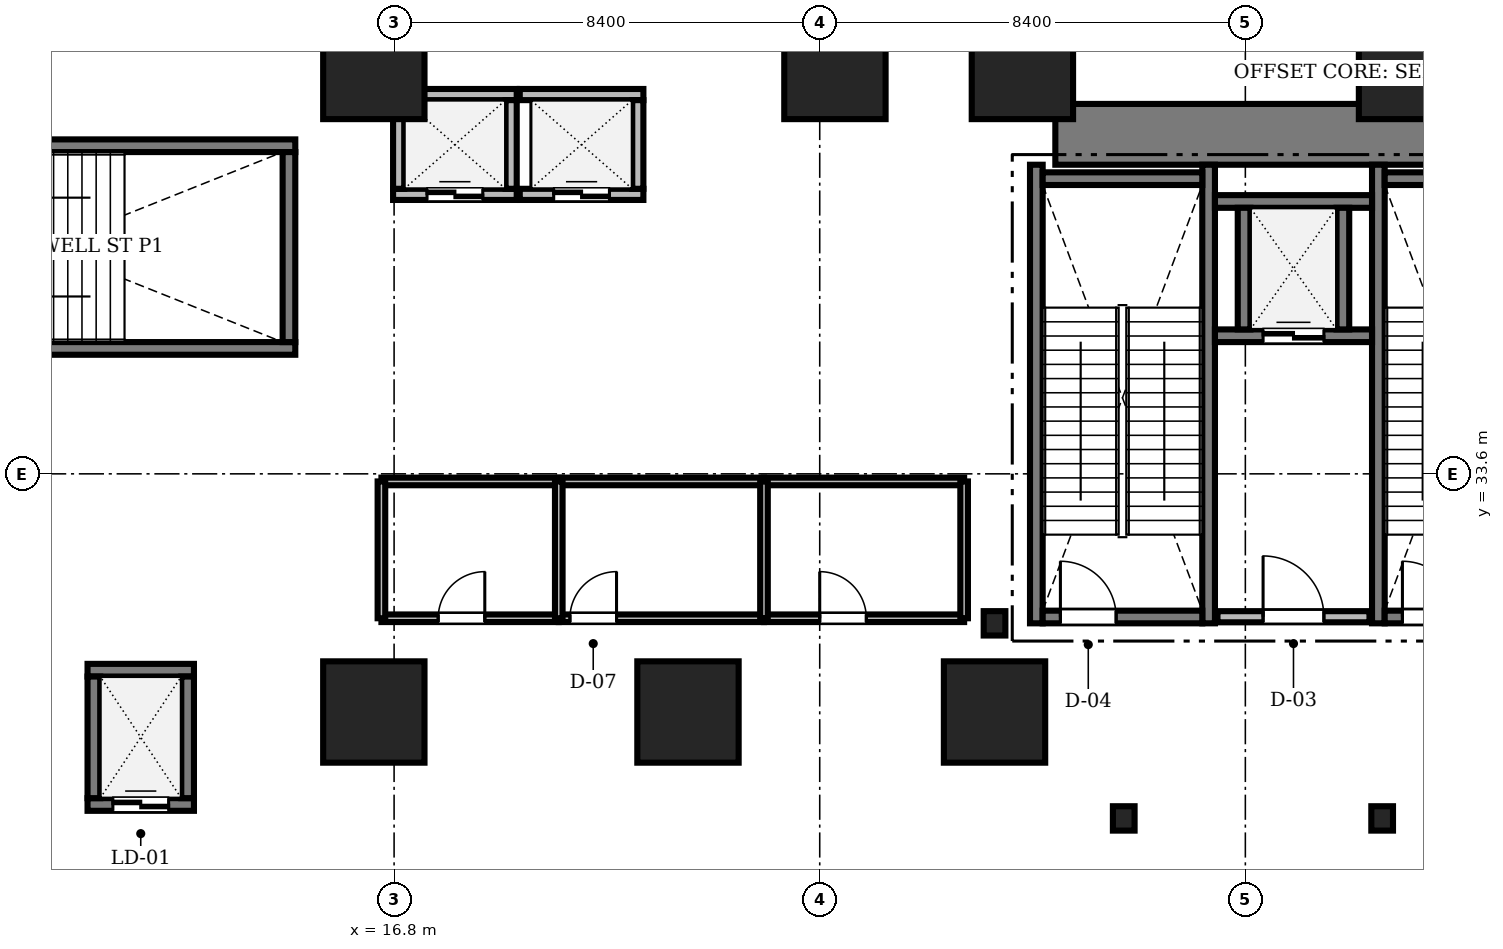
"""IFC4 building model, lengths in metres.
Left out: names, types, materials, properties, quantities, classifications, styles, units other than length and angle.
Written with IfcOpenShell. Run it as: python <this file> out.ifc"""

import sys

from ifc_helpers import new_model, si_unit, direction, frame, frame_2d, origin, origin_2d, place, context, subcontext, project, spatial, rectangle, i_section, extrude, source, transform, mapped, element, fill, save


model = new_model("IFC4")
c1 = context("Model", 3, precision=1e-05, world=origin(), true_north=direction((0.0, 1.0)))
c2 = subcontext(c1, "Body", "Model", "MODEL_VIEW")
j1 = project(units=[si_unit("LENGTHUNIT", "METRE"), si_unit("PLANEANGLEUNIT", "RADIAN")], contexts=[c1])
p1 = place(None, origin())
s1 = spatial("IfcSite", under=j1, at=p1, CompositionType="ELEMENT")
p2 = place(p1, origin())
s2 = spatial("IfcBuilding", under=s1, at=p2, CompositionType="ELEMENT")
p3 = place(p2, frame((0.0, 0.0, -6.0)))
s3 = spatial("IfcBuildingStorey", under=s2, at=p3, CompositionType="ELEMENT", Elevation=-6.0)
m1 = source(origin(), c2, "Body", "SweptSolid", [
    extrude(rectangle(XDim=17.52, YDim=1.2, at=frame_2d((8.76, 0.0))), origin(), (0.0, 0.0, 1.0), 5.6),
])
p4 = place(p3, frame((29.85, 40.3, 0.0), z_axis=(0.0, 0.0, 1.0), x_axis=(1.0, 0.0, 0.0)))
e1 = element("IfcWall", 1, at=p4, inside=s3, PredefinedType="SHEAR", context=c2, shape_type="MappedRepresentation", body=[
    mapped(m1, transform((0.0, 0.0, 0.0), scale=1.0)),
])
m2 = source(origin(), c2, "Body", "SweptSolid", [
    extrude(i_section(OverallWidth=0.428, OverallDepth=0.481, WebThickness=0.04, FlangeThickness=0.063, FilletRadius=0.015, at=origin_2d()), origin(), (0.0, 0.0, 1.0), 5.6),
])
for number, where, z_axis, x_axis in (
    (2, (36.3, 26.8, 0.0), (0.0, 0.0, 1.0), (1.0, 0.0, 0.0)),
    (3, (31.2, 26.8, 0.0), (0.0, 0.0, 1.0), (1.0, 0.0, 0.0)),
    (4, (28.65, 30.65, 0.0), (0.0, 0.0, 1.0), (1.0, 0.0, 0.0)),
):
    element("IfcColumn", number, at=place(p3, frame(where, z_axis=z_axis, x_axis=x_axis)), inside=s3, PredefinedType="COLUMN", context=c2, shape_type="MappedRepresentation", body=[
        mapped(m2, transform((0.0, 0.0, 0.0), scale=1.0)),
    ])
m3 = source(origin(), c2, "Body", "SweptSolid", [
    extrude(rectangle(XDim=2.0, YDim=2.0, at=origin_2d()), origin(), (0.0, 0.0, 1.0), 5.6),
])
for number, where, z_axis, x_axis in (
    (5, (16.4, 28.9, 0.0), (0.0, 0.0, 1.0), (1.0, 0.0, 0.0)),
    (6, (22.6, 28.9, 0.0), (0.0, 0.0, 1.0), (1.0, 0.0, 0.0)),
    (7, (28.65, 28.9, 0.0), (0.0, 0.0, 1.0), (1.0, 0.0, 0.0)),
    (8, (16.4, 41.6, 0.0), (0.0, 0.0, 1.0), (1.0, 0.0, 0.0)),
    (9, (25.5, 41.6, 0.0), (0.0, 0.0, 1.0), (1.0, 0.0, 0.0)),
    (10, (29.2, 41.6, 0.0), (0.0, 0.0, 1.0), (1.0, 0.0, 0.0)),
    (11, (36.84, 41.6, 0.0), (0.0, 0.0, 1.0), (1.0, 0.0, 0.0)),
):
    element("IfcColumn", number, at=place(p3, frame(where, z_axis=z_axis, x_axis=x_axis)), inside=s3, PredefinedType="COLUMN", context=c2, shape_type="MappedRepresentation", body=[
        mapped(m3, transform((0.0, 0.0, 0.0), scale=1.0)),
    ])
m4 = source(origin(), c2, "Body", "SweptSolid", [
    extrude(rectangle(XDim=9.05, YDim=0.25, at=frame_2d((4.525, 0.0))), origin(), (0.0, 0.0, 1.0), 5.8),
])
for number, where, z_axis, x_axis in (
    (12, (29.475, 30.65, 0.0), (0.0, 0.0, 1.0), (0.0, 1.0, 0.0)),
    (13, (32.875, 30.65, 0.0), (0.0, 0.0, 1.0), (0.0, 1.0, 0.0)),
):
    element("IfcWall", number, at=place(p3, frame(where, z_axis=z_axis, x_axis=x_axis)), inside=s3, PredefinedType="SOLIDWALL", context=c2, shape_type="MappedRepresentation", body=[
        mapped(m4, transform((0.0, 0.0, 0.0), scale=1.0)),
    ])
m5 = source(origin(), c2, "Body", "SweptSolid", [
    extrude(rectangle(XDim=3.15, YDim=0.25, at=frame_2d((1.575, 0.0))), origin(), (0.0, 0.0, 1.0), 5.8),
])
p5 = place(p3, frame((29.6, 39.425, 0.0), z_axis=(0.0, 0.0, 1.0), x_axis=(1.0, 0.0, 0.0)))
e14 = element("IfcWall", 14, at=p5, inside=s3, PredefinedType="SOLIDWALL", context=c2, shape_type="MappedRepresentation", body=[
    mapped(m5, transform((0.0, 0.0, 0.0), scale=1.0)),
])
p6 = place(p3, frame((29.6, 30.775, 0.0), z_axis=(0.0, 0.0, 1.0), x_axis=(1.0, 0.0, 0.0)))
e15 = element("IfcWall", 15, at=p6, inside=s3, PredefinedType="SOLIDWALL", context=c2, shape_type="MappedRepresentation", body=[
    mapped(m5, transform((0.0, 0.0, 0.0), scale=1.0)),
])
m6 = source(origin(), c2, "Body", "SweptSolid", [
    extrude(rectangle(XDim=1.1, YDim=2.2, at=frame_2d((0.55, 1.1))), frame((0.0, 0.135, 0.0), z_axis=(0.0, -1.0, 0.0), x_axis=(1.0, 0.0, 0.0)), (0.0, 0.0, 1.0), 0.27),
])
p7 = place(p6, frame((0.35, 0.0, 0.0)))
e16 = element("IfcOpeningElement", 16, at=p7, cuts=e15, PredefinedType="OPENING", context=c2, shape_type="MappedRepresentation", body=[
    mapped(m6, transform((0.0, 0.0, 0.0), scale=1.0)),
])
p8 = place(p3, frame((36.225, 30.65, 0.0), z_axis=(0.0, 0.0, 1.0), x_axis=(0.0, 1.0, 0.0)))
e17 = element("IfcWall", 17, at=p8, inside=s3, PredefinedType="SOLIDWALL", context=c2, shape_type="MappedRepresentation", body=[
    mapped(m4, transform((0.0, 0.0, 0.0), scale=1.0)),
])
p9 = place(p3, frame((36.35, 39.425, 0.0), z_axis=(0.0, 0.0, 1.0), x_axis=(1.0, 0.0, 0.0)))
e18 = element("IfcWall", 18, at=p9, inside=s3, PredefinedType="SOLIDWALL", context=c2, shape_type="MappedRepresentation", body=[
    mapped(m5, transform((0.0, 0.0, 0.0), scale=1.0)),
])
p10 = place(p3, frame((36.35, 30.775, 0.0), z_axis=(0.0, 0.0, 1.0), x_axis=(1.0, 0.0, 0.0)))
e19 = element("IfcWall", 19, at=p10, inside=s3, PredefinedType="SOLIDWALL", context=c2, shape_type="MappedRepresentation", body=[
    mapped(m5, transform((0.0, 0.0, 0.0), scale=1.0)),
])
p11 = place(p10, frame((0.35, 0.0, 0.0)))
e20 = element("IfcOpeningElement", 20, at=p11, cuts=e19, PredefinedType="OPENING", context=c2, shape_type="MappedRepresentation", body=[
    mapped(m6, transform((0.0, 0.0, 0.0), scale=1.0)),
])
m7 = source(origin(), c2, "Body", "SweptSolid", [
    extrude(rectangle(XDim=9.9, YDim=0.25, at=frame_2d((4.95, 0.0))), origin(), (0.0, 0.0, 1.0), 5.8),
])
for number, where, z_axis, x_axis in (
    (21, (4.95, 36.075, 0.0), (0.0, 0.0, 1.0), (1.0, 0.0, 0.0)),
    (22, (4.95, 40.075, 0.0), (0.0, 0.0, 1.0), (1.0, 0.0, 0.0)),
):
    element("IfcWall", number, at=place(p3, frame(where, z_axis=z_axis, x_axis=x_axis)), inside=s3, PredefinedType="SOLIDWALL", context=c2, shape_type="MappedRepresentation", body=[
        mapped(m7, transform((0.0, 0.0, 0.0), scale=1.0)),
    ])
m8 = source(origin(), c2, "Body", "SweptSolid", [
    extrude(rectangle(XDim=3.75, YDim=0.25, at=frame_2d((1.875, 0.0))), origin(), (0.0, 0.0, 1.0), 5.8),
])
p12 = place(p3, frame((14.725, 36.2, 0.0), z_axis=(0.0, 0.0, 1.0), x_axis=(0.0, 1.0, 0.0)))
e23 = element("IfcWall", 23, at=p12, inside=s3, PredefinedType="SOLIDWALL", context=c2, shape_type="MappedRepresentation", body=[
    mapped(m8, transform((0.0, 0.0, 0.0), scale=1.0)),
])
m9 = source(origin(), c2, "Body", "SweptSolid", [
    extrude(rectangle(XDim=3.0, YDim=0.22, at=frame_2d((1.5, 0.0))), origin(), (0.0, 0.0, 1.0), 5.6),
])
p13 = place(p3, frame((33.05, 30.78, 0.0), z_axis=(0.0, 0.0, 1.0), x_axis=(1.0, 0.0, 0.0)))
e24 = element("IfcWall", 24, at=p13, inside=s3, PredefinedType="SOLIDWALL", context=c2, shape_type="MappedRepresentation", body=[
    mapped(m9, transform((0.0, 0.0, 0.0), scale=1.0)),
])
m10 = source(origin(), c2, "Body", "SweptSolid", [
    extrude(rectangle(XDim=1.2, YDim=2.2, at=frame_2d((0.6, 1.1))), frame((0.0, 0.12, 0.0), z_axis=(0.0, -1.0, 0.0), x_axis=(1.0, 0.0, 0.0)), (0.0, 0.0, 1.0), 0.24),
])
p14 = place(p13, frame((0.9, 0.0, 0.0)))
e25 = element("IfcOpeningElement", 25, at=p14, cuts=e24, PredefinedType="OPENING", context=c2, shape_type="MappedRepresentation", body=[
    mapped(m10, transform((0.0, 0.0, 0.0), scale=1.0)),
])
m11 = source(origin(), c2, "Body", "SweptSolid", [
    extrude(rectangle(XDim=2.1, YDim=0.25, at=frame_2d((1.05, 0.0))), origin(), (0.0, 0.0, 1.0), 5.6),
])
p15 = place(p3, frame((10.75, 27.075, 0.0), z_axis=(0.0, 0.0, 1.0), x_axis=(1.0, 0.0, 0.0)))
e26 = element("IfcWall", 26, at=p15, inside=s3, PredefinedType="SOLIDWALL", context=c2, shape_type="MappedRepresentation", body=[
    mapped(m11, transform((0.0, 0.0, 0.0), scale=1.0)),
])
p16 = place(p15, frame((0.5, 0.0, 0.0)))
e27 = element("IfcOpeningElement", 27, at=p16, cuts=e26, PredefinedType="OPENING", context=c2, shape_type="MappedRepresentation", body=[
    mapped(m6, transform((0.0, 0.0, 0.0), scale=1.0)),
])
p17 = place(p3, frame((10.75, 29.725, 0.0), z_axis=(0.0, 0.0, 1.0), x_axis=(1.0, 0.0, 0.0)))
e28 = element("IfcWall", 28, at=p17, inside=s3, PredefinedType="SOLIDWALL", context=c2, shape_type="MappedRepresentation", body=[
    mapped(m11, transform((0.0, 0.0, 0.0), scale=1.0)),
])
m12 = source(origin(), c2, "Body", "SweptSolid", [
    extrude(rectangle(XDim=2.4, YDim=0.25, at=frame_2d((1.2, 0.0))), origin(), (0.0, 0.0, 1.0), 5.6),
])
for number, where, z_axis, x_axis in (
    (29, (10.875, 27.2, 0.0), (0.0, 0.0, 1.0), (0.0, 1.0, 0.0)),
    (30, (12.725, 27.2, 0.0), (0.0, 0.0, 1.0), (0.0, 1.0, 0.0)),
):
    element("IfcWall", number, at=place(p3, frame(where, z_axis=z_axis, x_axis=x_axis)), inside=s3, PredefinedType="SOLIDWALL", context=c2, shape_type="MappedRepresentation", body=[
        mapped(m12, transform((0.0, 0.0, 0.0), scale=1.0)),
    ])
m13 = source(origin(), c2, "Body", "SweptSolid", [
    extrude(rectangle(XDim=2.44, YDim=0.22, at=frame_2d((1.22, 0.0))), origin(), (0.0, 0.0, 1.0), 5.6),
])
p18 = place(p3, frame((16.78, 39.115, 0.0), z_axis=(0.0, 0.0, 1.0), x_axis=(1.0, 0.0, 0.0)))
e31 = element("IfcWall", 31, at=p18, inside=s3, PredefinedType="SOLIDWALL", context=c2, shape_type="MappedRepresentation", body=[
    mapped(m13, transform((0.0, 0.0, 0.0), scale=1.0)),
])
m14 = source(origin(), c2, "Body", "SweptSolid", [
    extrude(rectangle(XDim=1.1, YDim=2.2, at=frame_2d((0.55, 1.1))), frame((0.0, 0.12, 0.0), z_axis=(0.0, -1.0, 0.0), x_axis=(1.0, 0.0, 0.0)), (0.0, 0.0, 1.0), 0.24),
])
p19 = place(p18, frame((0.67, 0.0, 0.0)))
e32 = element("IfcOpeningElement", 32, at=p19, cuts=e31, PredefinedType="OPENING", context=c2, shape_type="MappedRepresentation", body=[
    mapped(m14, transform((0.0, 0.0, 0.0), scale=1.0)),
])
p20 = place(p3, frame((16.78, 41.085, 0.0), z_axis=(0.0, 0.0, 1.0), x_axis=(1.0, 0.0, 0.0)))
e33 = element("IfcWall", 33, at=p20, inside=s3, PredefinedType="SOLIDWALL", context=c2, shape_type="MappedRepresentation", body=[
    mapped(m13, transform((0.0, 0.0, 0.0), scale=1.0)),
])
m15 = source(origin(), c2, "Body", "SweptSolid", [
    extrude(rectangle(XDim=1.75, YDim=0.22, at=frame_2d((0.875, 0.0))), origin(), (0.0, 0.0, 1.0), 5.6),
])
for number, where, z_axis, x_axis in (
    (34, (16.89, 39.225, 0.0), (0.0, 0.0, 1.0), (0.0, 1.0, 0.0)),
    (35, (19.11, 39.225, 0.0), (0.0, 0.0, 1.0), (0.0, 1.0, 0.0)),
):
    element("IfcWall", number, at=place(p3, frame(where, z_axis=z_axis, x_axis=x_axis)), inside=s3, PredefinedType="SOLIDWALL", context=c2, shape_type="MappedRepresentation", body=[
        mapped(m15, transform((0.0, 0.0, 0.0), scale=1.0)),
    ])
p21 = place(p3, frame((19.28, 39.115, 0.0), z_axis=(0.0, 0.0, 1.0), x_axis=(1.0, 0.0, 0.0)))
e36 = element("IfcWall", 36, at=p21, inside=s3, PredefinedType="SOLIDWALL", context=c2, shape_type="MappedRepresentation", body=[
    mapped(m13, transform((0.0, 0.0, 0.0), scale=1.0)),
])
p22 = place(p21, frame((0.67, 0.0, 0.0)))
e37 = element("IfcOpeningElement", 37, at=p22, cuts=e36, PredefinedType="OPENING", context=c2, shape_type="MappedRepresentation", body=[
    mapped(m14, transform((0.0, 0.0, 0.0), scale=1.0)),
])
p23 = place(p3, frame((19.28, 41.085, 0.0), z_axis=(0.0, 0.0, 1.0), x_axis=(1.0, 0.0, 0.0)))
e38 = element("IfcWall", 38, at=p23, inside=s3, PredefinedType="SOLIDWALL", context=c2, shape_type="MappedRepresentation", body=[
    mapped(m13, transform((0.0, 0.0, 0.0), scale=1.0)),
])
p24 = place(p3, frame((21.61, 39.225, 0.0), z_axis=(0.0, 0.0, 1.0), x_axis=(0.0, 1.0, 0.0)))
e39 = element("IfcWall", 39, at=p24, inside=s3, PredefinedType="SOLIDWALL", context=c2, shape_type="MappedRepresentation", body=[
    mapped(m15, transform((0.0, 0.0, 0.0), scale=1.0)),
])
m16 = source(origin(), c2, "Body", "SweptSolid", [
    extrude(rectangle(XDim=3.1, YDim=0.25, at=frame_2d((1.55, 0.0))), origin(), (0.0, 0.0, 1.0), 5.6),
])
p25 = place(p3, frame((33.0, 36.325, 0.0), z_axis=(0.0, 0.0, 1.0), x_axis=(1.0, 0.0, 0.0)))
e40 = element("IfcWall", 40, at=p25, inside=s3, PredefinedType="SOLIDWALL", context=c2, shape_type="MappedRepresentation", body=[
    mapped(m16, transform((0.0, 0.0, 0.0), scale=1.0)),
])
m17 = source(origin(), c2, "Body", "SweptSolid", [
    extrude(rectangle(XDim=1.2, YDim=2.25, at=frame_2d((0.6, 1.125))), frame((0.0, 0.135, 0.0), z_axis=(0.0, -1.0, 0.0), x_axis=(1.0, 0.0, 0.0)), (0.0, 0.0, 1.0), 0.27),
])
p26 = place(p25, frame((0.95, 0.0, 0.0)))
e41 = element("IfcOpeningElement", 41, at=p26, cuts=e40, PredefinedType="OPENING", context=c2, shape_type="MappedRepresentation", body=[
    mapped(m17, transform((0.0, 0.0, 0.0), scale=1.0)),
])
p27 = place(p3, frame((33.0, 38.975, 0.0), z_axis=(0.0, 0.0, 1.0), x_axis=(1.0, 0.0, 0.0)))
e42 = element("IfcWall", 42, at=p27, inside=s3, PredefinedType="SOLIDWALL", context=c2, shape_type="MappedRepresentation", body=[
    mapped(m16, transform((0.0, 0.0, 0.0), scale=1.0)),
])
for number, where, z_axis, x_axis in (
    (43, (33.575, 36.45, 0.0), (0.0, 0.0, 1.0), (0.0, 1.0, 0.0)),
    (44, (35.525, 36.45, 0.0), (0.0, 0.0, 1.0), (0.0, 1.0, 0.0)),
):
    element("IfcWall", number, at=place(p3, frame(where, z_axis=z_axis, x_axis=x_axis)), inside=s3, PredefinedType="SOLIDWALL", context=c2, shape_type="MappedRepresentation", body=[
        mapped(m12, transform((0.0, 0.0, 0.0), scale=1.0)),
    ])
m18 = source(origin(), c2, "Body", "SweptSolid", [
    extrude(rectangle(XDim=4.05, YDim=0.15, at=frame_2d((2.025, 0.0))), origin(), (0.0, 0.0, 1.0), 5.6),
])
p28 = place(p3, frame((20.05, 30.75, 0.0), z_axis=(0.0, 0.0, 1.0), x_axis=(1.0, 0.0, 0.0)))
e45 = element("IfcWall", 45, at=p28, inside=s3, PredefinedType="PARTITIONING", context=c2, shape_type="MappedRepresentation", body=[
    mapped(m18, transform((0.0, 0.0, 0.0), scale=1.0)),
])
m19 = source(origin(), c2, "Body", "SweptSolid", [
    extrude(rectangle(XDim=0.92, YDim=2.1, at=frame_2d((0.46, 1.05))), frame((0.0, 0.085, 0.0), z_axis=(0.0, -1.0, 0.0), x_axis=(1.0, 0.0, 0.0)), (0.0, 0.0, 1.0), 0.17),
])
p29 = place(p28, frame((0.22, 0.0, 0.0)))
e46 = element("IfcOpeningElement", 46, at=p29, cuts=e45, PredefinedType="OPENING", context=c2, shape_type="MappedRepresentation", body=[
    mapped(m19, transform((0.0, 0.0, 0.0), scale=1.0)),
])
m20 = source(origin(), c2, "Body", "SweptSolid", [
    extrude(rectangle(XDim=3.95, YDim=0.15, at=frame_2d((1.975, 0.0))), origin(), (0.0, 0.0, 1.0), 5.6),
])
p30 = place(p3, frame((24.1, 30.75, 0.0), z_axis=(0.0, 0.0, 1.0), x_axis=(1.0, 0.0, 0.0)))
e47 = element("IfcWall", 47, at=p30, inside=s3, PredefinedType="PARTITIONING", context=c2, shape_type="MappedRepresentation", body=[
    mapped(m20, transform((0.0, 0.0, 0.0), scale=1.0)),
])
p31 = place(p30, frame((1.1, 0.0, 0.0)))
e48 = element("IfcOpeningElement", 48, at=p31, cuts=e47, PredefinedType="OPENING", context=c2, shape_type="MappedRepresentation", body=[
    mapped(m19, transform((0.0, 0.0, 0.0), scale=1.0)),
])
m21 = source(origin(), c2, "Body", "SweptSolid", [
    extrude(rectangle(XDim=3.5, YDim=0.15, at=frame_2d((1.75, 0.0))), origin(), (0.0, 0.0, 1.0), 5.6),
])
p32 = place(p3, frame((16.55, 30.75, 0.0), z_axis=(0.0, 0.0, 1.0), x_axis=(1.0, 0.0, 0.0)))
e49 = element("IfcWall", 49, at=p32, inside=s3, PredefinedType="PARTITIONING", context=c2, shape_type="MappedRepresentation", body=[
    mapped(m21, transform((0.0, 0.0, 0.0), scale=1.0)),
])
p33 = place(p32, frame((1.12, 0.0, 0.0)))
e50 = element("IfcOpeningElement", 50, at=p33, cuts=e49, PredefinedType="OPENING", context=c2, shape_type="MappedRepresentation", body=[
    mapped(m19, transform((0.0, 0.0, 0.0), scale=1.0)),
])
p34 = place(p3, frame((20.05, 33.45, 0.0), z_axis=(0.0, 0.0, 1.0), x_axis=(1.0, 0.0, 0.0)))
e51 = element("IfcWall", 51, at=p34, inside=s3, PredefinedType="PARTITIONING", context=c2, shape_type="MappedRepresentation", body=[
    mapped(m18, transform((0.0, 0.0, 0.0), scale=1.0)),
])
p35 = place(p3, frame((24.1, 33.45, 0.0), z_axis=(0.0, 0.0, 1.0), x_axis=(1.0, 0.0, 0.0)))
e52 = element("IfcWall", 52, at=p35, inside=s3, PredefinedType="PARTITIONING", context=c2, shape_type="MappedRepresentation", body=[
    mapped(m20, transform((0.0, 0.0, 0.0), scale=1.0)),
])
p36 = place(p3, frame((16.55, 33.45, 0.0), z_axis=(0.0, 0.0, 1.0), x_axis=(1.0, 0.0, 0.0)))
e53 = element("IfcWall", 53, at=p36, inside=s3, PredefinedType="PARTITIONING", context=c2, shape_type="MappedRepresentation", body=[
    mapped(m21, transform((0.0, 0.0, 0.0), scale=1.0)),
])
m22 = source(origin(), c2, "Body", "SweptSolid", [
    extrude(rectangle(XDim=2.7, YDim=0.15, at=frame_2d((1.35, 0.0))), origin(), (0.0, 0.0, 1.0), 4.992),
])
p37 = place(p3, frame((16.55, 30.75, 0.0), z_axis=(0.0, 0.0, 1.0), x_axis=(0.0, 1.0, 0.0)))
e54 = element("IfcWall", 54, at=p37, inside=s3, PredefinedType="PARTITIONING", context=c2, shape_type="MappedRepresentation", body=[
    mapped(m22, transform((0.0, 0.0, 0.0), scale=1.0)),
])
m23 = source(origin(), c2, "Body", "SweptSolid", [
    extrude(rectangle(XDim=2.7, YDim=0.15, at=frame_2d((1.35, 0.0))), origin(), (0.0, 0.0, 1.0), 5.6),
])
for number, where, z_axis, x_axis in (
    (55, (20.05, 30.75, 0.0), (0.0, 0.0, 1.0), (0.0, 1.0, 0.0)),
    (56, (24.1, 30.75, 0.0), (0.0, 0.0, 1.0), (0.0, 1.0, 0.0)),
    (57, (28.05, 30.75, 0.0), (0.0, 0.0, 1.0), (0.0, 1.0, 0.0)),
):
    element("IfcWall", number, at=place(p3, frame(where, z_axis=z_axis, x_axis=x_axis)), inside=s3, PredefinedType="PARTITIONING", context=c2, shape_type="MappedRepresentation", body=[
        mapped(m23, transform((0.0, 0.0, 0.0), scale=1.0)),
    ])
m24 = source(origin(), c2, "Body", "SweptSolid", [
    extrude(rectangle(XDim=1.1, YDim=2.2, at=frame_2d((0.55, 1.1))), frame((0.0, 0.025, 0.0), z_axis=(0.0, -1.0, 0.0), x_axis=(1.0, 0.0, 0.0)), (0.0, 0.0, 1.0), 0.05),
])
p38 = place(p7, origin())
e58 = element("IfcDoor", 58, at=p38, inside=s3, OperationType="SINGLE_SWING_LEFT", PredefinedType="DOOR", context=c2, shape_type="MappedRepresentation", body=[
    mapped(m24, transform((0.0, 0.0, 0.0), scale=1.0)),
])
fill(e16, e58)
p39 = place(p11, origin())
e59 = element("IfcDoor", 59, at=p39, inside=s3, OperationType="SINGLE_SWING_LEFT", PredefinedType="DOOR", context=c2, shape_type="MappedRepresentation", body=[
    mapped(m24, transform((0.0, 0.0, 0.0), scale=1.0)),
])
fill(e20, e59)
m25 = source(origin(), c2, "Body", "SweptSolid", [
    extrude(rectangle(XDim=1.2, YDim=2.2, at=frame_2d((0.6, 1.1))), frame((0.0, 0.025, 0.0), z_axis=(0.0, -1.0, 0.0), x_axis=(1.0, 0.0, 0.0)), (0.0, 0.0, 1.0), 0.05),
])
p40 = place(p14, origin())
e60 = element("IfcDoor", 60, at=p40, inside=s3, OperationType="SINGLE_SWING_LEFT", PredefinedType="DOOR", context=c2, shape_type="MappedRepresentation", body=[
    mapped(m25, transform((0.0, 0.0, 0.0), scale=1.0)),
])
fill(e25, e60)
p41 = place(p16, origin())
e61 = element("IfcDoor", 61, at=p41, inside=s3, OperationType="DOUBLE_DOOR_SLIDING", PredefinedType="DOOR", context=c2, shape_type="MappedRepresentation", body=[
    mapped(m24, transform((0.0, 0.0, 0.0), scale=1.0)),
])
fill(e27, e61)
p42 = place(p19, origin())
e62 = element("IfcDoor", 62, at=p42, inside=s3, OperationType="DOUBLE_DOOR_SLIDING", PredefinedType="DOOR", context=c2, shape_type="MappedRepresentation", body=[
    mapped(m24, transform((0.0, 0.0, 0.0), scale=1.0)),
])
fill(e32, e62)
p43 = place(p22, origin())
e63 = element("IfcDoor", 63, at=p43, inside=s3, OperationType="DOUBLE_DOOR_SLIDING", PredefinedType="DOOR", context=c2, shape_type="MappedRepresentation", body=[
    mapped(m24, transform((0.0, 0.0, 0.0), scale=1.0)),
])
fill(e37, e63)
m26 = source(origin(), c2, "Body", "SweptSolid", [
    extrude(rectangle(XDim=1.2, YDim=2.25, at=frame_2d((0.6, 1.125))), frame((0.0, 0.025, 0.0), z_axis=(0.0, -1.0, 0.0), x_axis=(1.0, 0.0, 0.0)), (0.0, 0.0, 1.0), 0.05),
])
p44 = place(p26, origin())
e64 = element("IfcDoor", 64, at=p44, inside=s3, OperationType="DOUBLE_DOOR_SLIDING", PredefinedType="DOOR", context=c2, shape_type="MappedRepresentation", body=[
    mapped(m26, transform((0.0, 0.0, 0.0), scale=1.0)),
])
fill(e41, e64)
m27 = source(origin(), c2, "Body", "SweptSolid", [
    extrude(rectangle(XDim=0.92, YDim=2.1, at=frame_2d((0.46, 1.05))), frame((0.0, 0.025, 0.0), z_axis=(0.0, -1.0, 0.0), x_axis=(1.0, 0.0, 0.0)), (0.0, 0.0, 1.0), 0.05),
])
p45 = place(p29, origin())
e65 = element("IfcDoor", 65, at=p45, inside=s3, OperationType="SINGLE_SWING_RIGHT", PredefinedType="DOOR", context=c2, shape_type="MappedRepresentation", body=[
    mapped(m27, transform((0.0, 0.0, 0.0), scale=1.0)),
])
fill(e46, e65)
p46 = place(p31, origin())
e66 = element("IfcDoor", 66, at=p46, inside=s3, OperationType="SINGLE_SWING_LEFT", PredefinedType="DOOR", context=c2, shape_type="MappedRepresentation", body=[
    mapped(m27, transform((0.0, 0.0, 0.0), scale=1.0)),
])
fill(e48, e66)
p47 = place(p33, origin())
e67 = element("IfcDoor", 67, at=p47, inside=s3, OperationType="SINGLE_SWING_RIGHT", PredefinedType="DOOR", context=c2, shape_type="MappedRepresentation", body=[
    mapped(m27, transform((0.0, 0.0, 0.0), scale=1.0)),
])
fill(e50, e67)
save(model, sys.argv[1])
